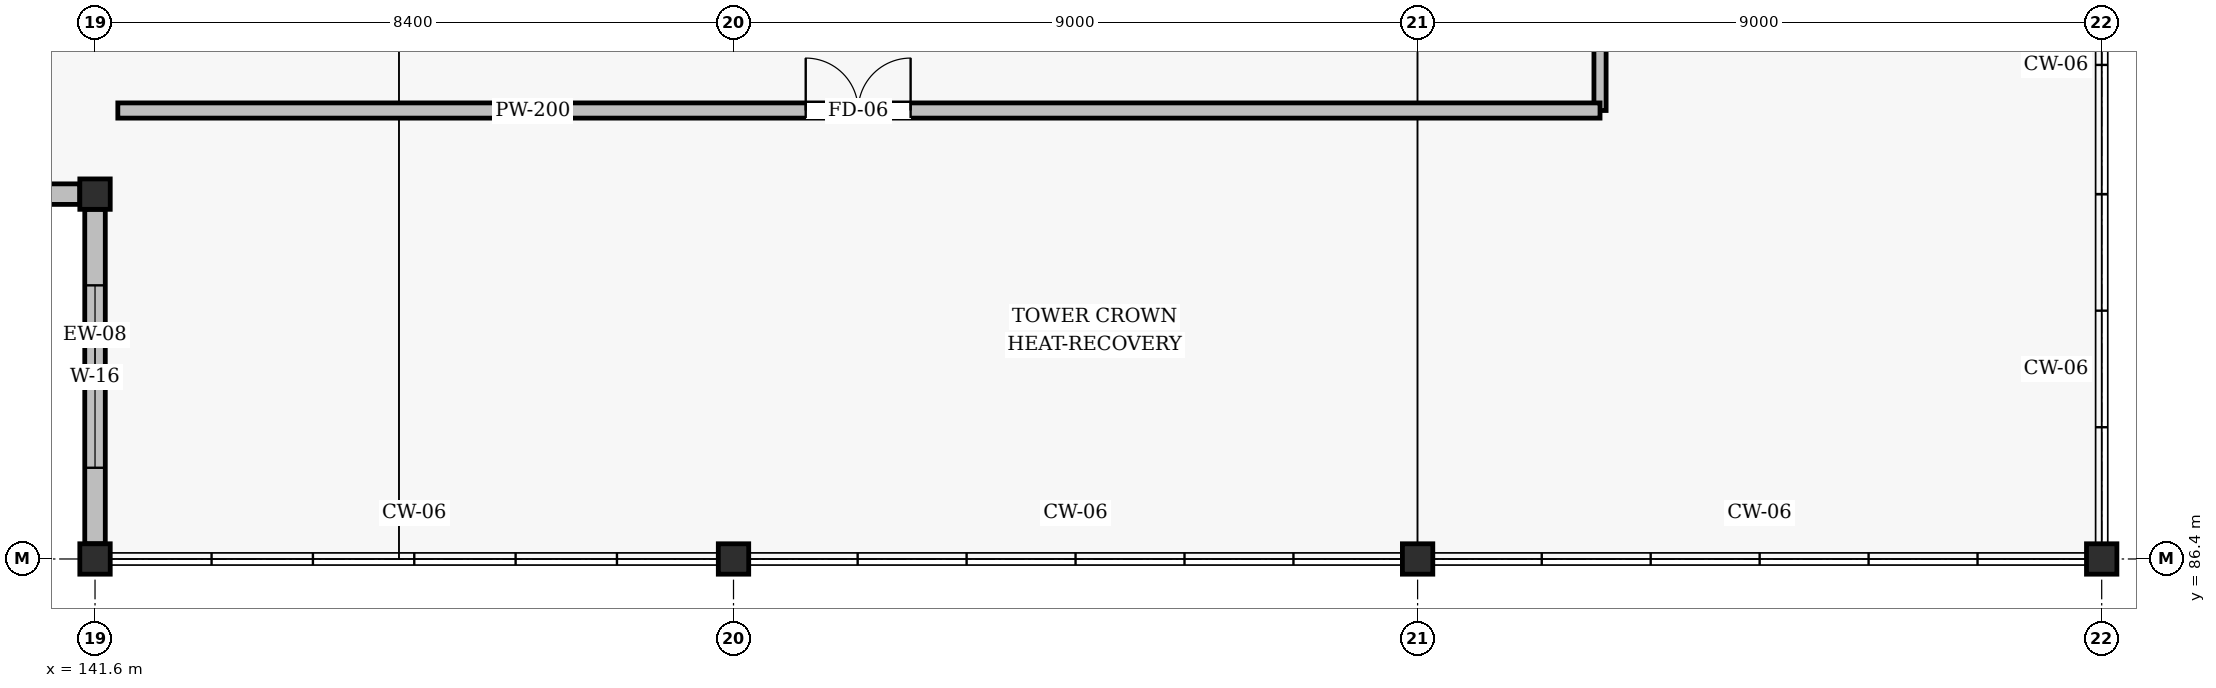
"""IFC4 building model, lengths in metres.
Left out: names, types, materials, properties, quantities, classifications, styles, units other than length and angle.
Written with IfcOpenShell. Run it as: python <this file> out.ifc"""

import sys

from ifc_helpers import new_model, si_unit, direction, frame, frame_2d, origin, origin_2d, place, context, subcontext, project, spatial, rectangle, hollow_rectangle, extrude, element, fill, save


model = new_model("IFC4")
c1 = context("Model", 3, precision=1e-05, world=origin(), true_north=direction((0.0, 1.0)))
c2 = subcontext(c1, "Body", "Model", "MODEL_VIEW")
j1 = project(units=[si_unit("LENGTHUNIT", "METRE"), si_unit("PLANEANGLEUNIT", "RADIAN")], contexts=[c1])
p1 = place(None, origin())
s1 = spatial("IfcSite", under=j1, at=p1, CompositionType="ELEMENT")
p2 = place(p1, origin())
s2 = spatial("IfcBuilding", under=s1, at=p2, CompositionType="ELEMENT")
p3 = place(p2, frame((0.0, 0.0, 61.2)))
s3 = spatial("IfcBuildingStorey", under=s2, at=p3, CompositionType="ELEMENT", Elevation=61.2)
for number, where, z_axis, x_axis in (
    (1, (141.6, 86.4, 0.0), (0.0, 0.0, 1.0), (1.0, 0.0, 0.0)),
    (2, (141.6, 91.2, 0.0), (0.0, 0.0, 1.0), (1.0, 0.0, 0.0)),
    (3, (150.0, 86.4, 0.0), (0.0, 0.0, 1.0), (1.0, 0.0, 0.0)),
    (4, (159.0, 86.4, 0.0), (0.0, 0.0, 1.0), (1.0, 0.0, 0.0)),
    (5, (168.0, 86.4, 0.0), (0.0, 0.0, 1.0), (1.0, 0.0, 0.0)),
):
    element("IfcColumn", number, at=place(p3, frame(where, z_axis=z_axis, x_axis=x_axis)), inside=s3, PredefinedType="COLUMN", context=c2, shape_type="SweptSolid", body=[
        extrude(hollow_rectangle(XDim=0.4, YDim=0.4, WallThickness=0.016, InnerFilletRadius=0.016, OuterFilletRadius=0.032, at=origin_2d()), origin(), (0.0, 0.0, 1.0), 4.2),
    ])
p4 = place(p3, frame((133.4, 91.2, 0.0), z_axis=(0.0, 0.0, 1.0), x_axis=(1.0, 0.0, 0.0)))
e6 = element("IfcWall", 6, at=p4, inside=s3, PredefinedType="SOLIDWALL", context=c2, shape_type="SweptSolid", body=[
    extrude(rectangle(XDim=8.0, YDim=0.27, at=frame_2d((4.0, 0.0))), origin(), (0.0, 0.0, 1.0), 3.51),
])
p5 = place(p4, frame((1.467, 0.0, 1.4)))
e7 = element("IfcOpeningElement", 7, at=p5, cuts=e6, PredefinedType="OPENING", context=c2, shape_type="SweptSolid", body=[
    extrude(rectangle(XDim=2.4, YDim=1.2, at=frame_2d((1.2, 0.6))), frame((0.0, 0.145, 0.0), z_axis=(0.0, -1.0, 0.0), x_axis=(1.0, 0.0, 0.0)), (0.0, 0.0, 1.0), 0.29),
])
p6 = place(p3, frame((141.6, 91.0, 0.0), z_axis=(0.0, 0.0, 1.0), x_axis=(0.0, -1.0, 0.0)))
e8 = element("IfcWall", 8, at=p6, inside=s3, PredefinedType="SOLIDWALL", context=c2, shape_type="SweptSolid", body=[
    extrude(rectangle(XDim=4.4, YDim=0.27, at=frame_2d((2.2, 0.0))), origin(), (0.0, 0.0, 1.0), 3.51),
])
p7 = place(p6, frame((1.0, 0.0, 1.4)))
e9 = element("IfcOpeningElement", 9, at=p7, cuts=e8, PredefinedType="OPENING", context=c2, shape_type="SweptSolid", body=[
    extrude(rectangle(XDim=2.4, YDim=1.2, at=frame_2d((1.2, 0.6))), frame((0.0, 0.145, 0.0), z_axis=(0.0, -1.0, 0.0), x_axis=(1.0, 0.0, 0.0)), (0.0, 0.0, 1.0), 0.29),
])
p8 = place(p3, frame((161.4, 92.3, 0.0), z_axis=(0.0, 0.0, 1.0), x_axis=(0.0, 1.0, 0.0)))
e10 = element("IfcWall", 10, at=p8, inside=s3, PredefinedType="PARTITIONING", context=c2, shape_type="SweptSolid", body=[
    extrude(rectangle(XDim=14.1, YDim=0.16, at=frame_2d((7.05, 0.0))), origin(), (0.0, 0.0, 1.0), 3.51),
])
p9 = place(p8, frame((6.5, 0.0, 0.0)))
e11 = element("IfcOpeningElement", 11, at=p9, cuts=e10, PredefinedType="OPENING", context=c2, shape_type="SweptSolid", body=[
    extrude(rectangle(XDim=1.08, YDim=2.08, at=frame_2d((0.54, 1.04))), frame((0.0, 0.09, 0.0), z_axis=(0.0, -1.0, 0.0), x_axis=(1.0, 0.0, 0.0)), (0.0, 0.0, 1.0), 0.18),
])
p10 = place(p3, frame((141.9, 92.3, 0.0), z_axis=(0.0, 0.0, 1.0), x_axis=(1.0, 0.0, 0.0)))
e12 = element("IfcWall", 12, at=p10, inside=s3, PredefinedType="SOLIDWALL", context=c2, shape_type="SweptSolid", body=[
    extrude(rectangle(XDim=19.5, YDim=0.2, at=frame_2d((9.75, 0.0))), origin(), (0.0, 0.0, 1.0), 3.51),
])
p11 = place(p10, frame((9.05, 0.0, 0.0)))
e13 = element("IfcOpeningElement", 13, at=p11, cuts=e12, PredefinedType="OPENING", context=c2, shape_type="SweptSolid", body=[
    extrude(rectangle(XDim=1.38, YDim=2.15, at=frame_2d((0.69, 1.075))), frame((0.0, 0.11, 0.0), z_axis=(0.0, -1.0, 0.0), x_axis=(1.0, 0.0, 0.0)), (0.0, 0.0, 1.0), 0.22),
])
p12 = place(p7, origin())
e14 = element("IfcWindow", 14, at=p12, inside=s3, PartitioningType="SINGLE_PANEL", PredefinedType="LIGHTDOME", context=c2, shape_type="SweptSolid", body=[
    extrude(rectangle(XDim=2.4, YDim=1.2, at=frame_2d((1.2, 0.6))), frame((0.0, 0.03, 0.0), z_axis=(0.0, -1.0, 0.0), x_axis=(1.0, 0.0, 0.0)), (0.0, 0.0, 1.0), 0.06),
])
fill(e9, e14)
p13 = place(p11, origin())
e15 = element("IfcDoor", 15, at=p13, inside=s3, OperationType="DOUBLE_DOOR_SINGLE_SWING", PredefinedType="DOOR", context=c2, shape_type="SweptSolid", body=[
    extrude(rectangle(XDim=1.38, YDim=2.15, at=frame_2d((0.69, 1.075))), frame((0.0, 0.025, 0.0), z_axis=(0.0, -1.0, 0.0), x_axis=(1.0, 0.0, 0.0)), (0.0, 0.0, 1.0), 0.05),
])
fill(e13, e15)
save(model, sys.argv[1])
